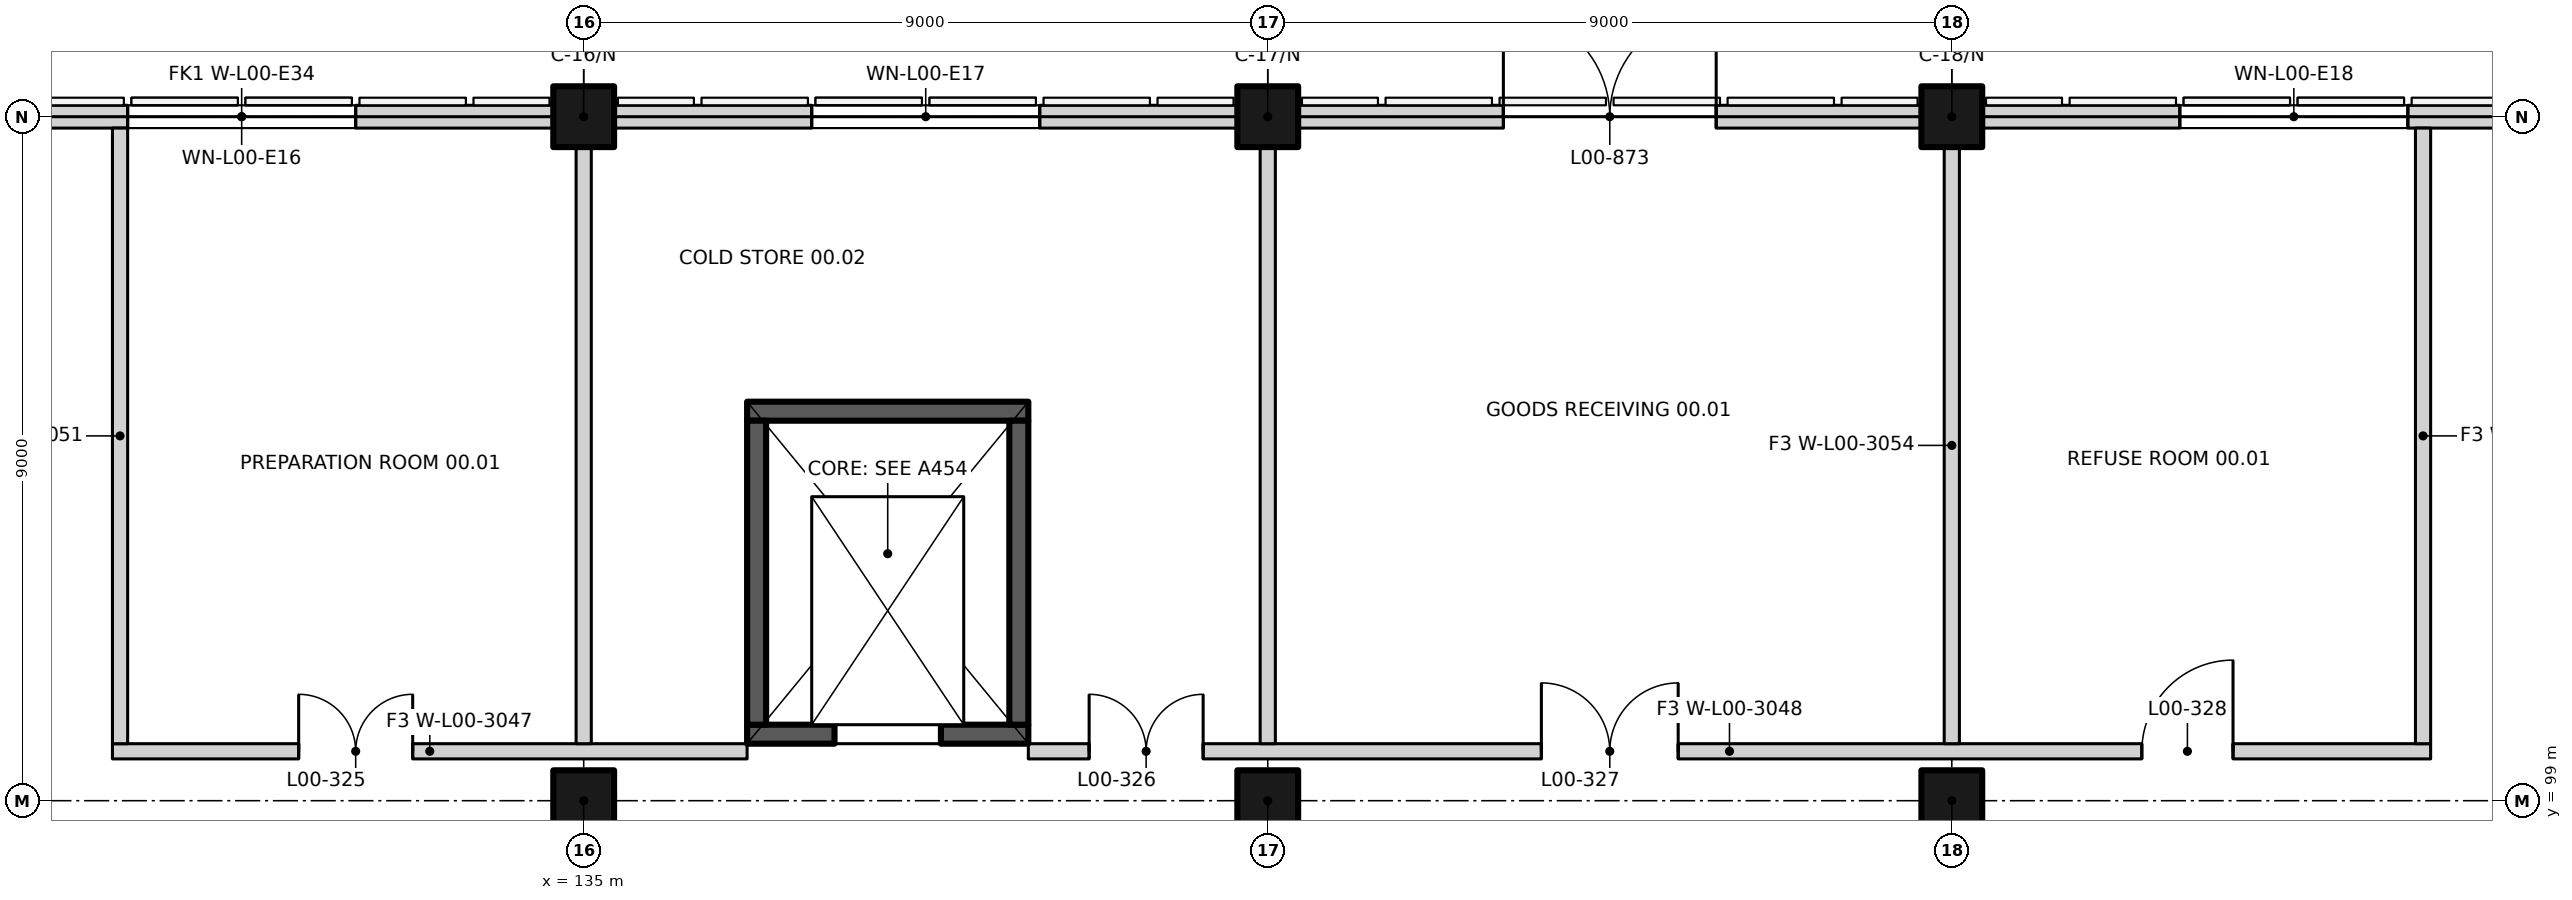
"""IFC4 building model, lengths in metres.
Left out: names, types, materials, properties, quantities, classifications, styles, units other than length and angle.
Written with IfcOpenShell. Run it as: python <this file> out.ifc"""

import sys

from ifc_helpers import new_model, si_unit, direction, frame, frame_2d, origin, origin_2d, place, context, subcontext, project, spatial, rectangle, extrude, element, fill, save


model = new_model("IFC4")
c1 = context("Model", 3, precision=1e-05, world=origin(), true_north=direction((0.0, 1.0)))
c2 = subcontext(c1, "Body", "Model", "MODEL_VIEW")
j1 = project(units=[si_unit("LENGTHUNIT", "METRE"), si_unit("PLANEANGLEUNIT", "RADIAN")], contexts=[c1])
p1 = place(None, origin())
s1 = spatial("IfcSite", under=j1, at=p1, CompositionType="ELEMENT")
p2 = place(p1, origin())
s2 = spatial("IfcBuilding", under=s1, at=p2, CompositionType="ELEMENT")
p3 = place(p2, origin())
s3 = spatial("IfcBuildingStorey", under=s2, at=p3, CompositionType="ELEMENT", Elevation=0.0)
for number, where, z_axis, x_axis in (
    (1, (135.0, 99.0, 0.0), (0.0, 0.0, 1.0), (1.0, 0.0, 0.0)),
    (2, (144.0, 99.0, 0.0), (0.0, 0.0, 1.0), (1.0, 0.0, 0.0)),
    (3, (153.0, 99.0, 0.0), (0.0, 0.0, 1.0), (1.0, 0.0, 0.0)),
    (4, (135.0, 108.0, 0.0), (0.0, 0.0, 1.0), (1.0, 0.0, 0.0)),
    (5, (144.0, 108.0, 0.0), (0.0, 0.0, 1.0), (1.0, 0.0, 0.0)),
    (6, (153.0, 108.0, 0.0), (0.0, 0.0, 1.0), (1.0, 0.0, 0.0)),
):
    element("IfcColumn", number, at=place(p3, frame(where, z_axis=z_axis, x_axis=x_axis)), inside=s3, PredefinedType="COLUMN", context=c2, shape_type="SweptSolid", body=[
        extrude(rectangle(XDim=0.8, YDim=0.8, at=origin_2d()), origin(), (0.0, 0.0, 1.0), 6.0),
    ])
p4 = place(p3, frame((137.15, 99.875, -1.6), z_axis=(0.0, 0.0, 1.0), x_axis=(1.0, 0.0, 0.0)))
e7 = element("IfcWall", 7, at=p4, inside=s3, PredefinedType="SHEAR", context=c2, shape_type="SweptSolid", body=[
    extrude(rectangle(XDim=3.7, YDim=0.25, at=frame_2d((1.85, 0.0))), origin(), (0.0, 0.0, 1.0), 7.6),
])
p5 = place(p4, frame((1.15, 0.0, 1.6)))
e8 = element("IfcOpeningElement", 8, at=p5, cuts=e7, PredefinedType="OPENING", context=c2, shape_type="SweptSolid", body=[
    extrude(rectangle(XDim=1.4, YDim=2.1, at=frame_2d((0.7, 1.05))), frame((0.0, 0.135, 0.0), z_axis=(0.0, -1.0, 0.0), x_axis=(1.0, 0.0, 0.0)), (0.0, 0.0, 1.0), 0.27),
])
p6 = place(p3, frame((137.15, 104.125, -1.6), z_axis=(0.0, 0.0, 1.0), x_axis=(1.0, 0.0, 0.0)))
e9 = element("IfcWall", 9, at=p6, inside=s3, PredefinedType="SHEAR", context=c2, shape_type="SweptSolid", body=[
    extrude(rectangle(XDim=3.7, YDim=0.25, at=frame_2d((1.85, 0.0))), origin(), (0.0, 0.0, 1.0), 7.6),
])
for number, where, z_axis, x_axis in (
    (10, (137.275, 100.0, -1.6), (0.0, 0.0, 1.0), (0.0, 1.0, 0.0)),
    (11, (140.725, 100.0, -1.6), (0.0, 0.0, 1.0), (0.0, 1.0, 0.0)),
):
    element("IfcWall", number, at=place(p3, frame(where, z_axis=z_axis, x_axis=x_axis)), inside=s3, PredefinedType="SHEAR", context=c2, shape_type="SweptSolid", body=[
        extrude(rectangle(XDim=4.0, YDim=0.25, at=frame_2d((2.0, 0.0))), origin(), (0.0, 0.0, 1.0), 7.6),
    ])
p7 = place(p3, frame((126.4, 108.0, 0.0), z_axis=(0.0, 0.0, 1.0), x_axis=(1.0, 0.0, 0.0)))
e12 = element("IfcWall", 12, at=p7, inside=s3, PredefinedType="SOLIDWALL", context=c2, shape_type="SweptSolid", body=[
    extrude(rectangle(XDim=8.2, YDim=0.3, at=frame_2d((4.1, 0.0))), origin(), (0.0, 0.0, 1.0), 5.2),
])
p8 = place(p7, frame((2.6, 0.0, 0.9)))
e13 = element("IfcOpeningElement", 13, at=p8, cuts=e12, PredefinedType="OPENING", context=c2, shape_type="SweptSolid", body=[
    extrude(rectangle(XDim=3.0, YDim=2.1, at=frame_2d((1.5, 1.05))), frame((0.0, 0.16, 0.0), z_axis=(0.0, -1.0, 0.0), x_axis=(1.0, 0.0, 0.0)), (0.0, 0.0, 1.0), 0.32),
])
p9 = place(p3, frame((135.4, 108.0, 0.0), z_axis=(0.0, 0.0, 1.0), x_axis=(1.0, 0.0, 0.0)))
e14 = element("IfcWall", 14, at=p9, inside=s3, PredefinedType="SOLIDWALL", context=c2, shape_type="SweptSolid", body=[
    extrude(rectangle(XDim=8.2, YDim=0.3, at=frame_2d((4.1, 0.0))), origin(), (0.0, 0.0, 1.0), 5.2),
])
p10 = place(p9, frame((2.6, 0.0, 0.9)))
e15 = element("IfcOpeningElement", 15, at=p10, cuts=e14, PredefinedType="OPENING", context=c2, shape_type="SweptSolid", body=[
    extrude(rectangle(XDim=3.0, YDim=2.1, at=frame_2d((1.5, 1.05))), frame((0.0, 0.16, 0.0), z_axis=(0.0, -1.0, 0.0), x_axis=(1.0, 0.0, 0.0)), (0.0, 0.0, 1.0), 0.32),
])
p11 = place(p3, frame((144.4, 108.0, 0.0), z_axis=(0.0, 0.0, 1.0), x_axis=(1.0, 0.0, 0.0)))
e16 = element("IfcWall", 16, at=p11, inside=s3, PredefinedType="SOLIDWALL", context=c2, shape_type="SweptSolid", body=[
    extrude(rectangle(XDim=8.2, YDim=0.3, at=frame_2d((4.1, 0.0))), origin(), (0.0, 0.0, 1.0), 5.2),
])
p12 = place(p11, frame((2.7, 0.0, 0.0)))
e17 = element("IfcOpeningElement", 17, at=p12, cuts=e16, PredefinedType="OPENING", context=c2, shape_type="SweptSolid", body=[
    extrude(rectangle(XDim=2.8, YDim=2.4, at=frame_2d((1.4, 1.2))), frame((0.0, 0.16, 0.0), z_axis=(0.0, -1.0, 0.0), x_axis=(1.0, 0.0, 0.0)), (0.0, 0.0, 1.0), 0.32),
])
p13 = place(p3, frame((153.4, 108.0, 0.0), z_axis=(0.0, 0.0, 1.0), x_axis=(1.0, 0.0, 0.0)))
e18 = element("IfcWall", 18, at=p13, inside=s3, PredefinedType="SOLIDWALL", context=c2, shape_type="SweptSolid", body=[
    extrude(rectangle(XDim=8.2, YDim=0.3, at=frame_2d((4.1, 0.0))), origin(), (0.0, 0.0, 1.0), 5.2),
])
p14 = place(p13, frame((2.6, 0.0, 0.9)))
e19 = element("IfcOpeningElement", 19, at=p14, cuts=e18, PredefinedType="OPENING", context=c2, shape_type="SweptSolid", body=[
    extrude(rectangle(XDim=3.0, YDim=2.1, at=frame_2d((1.5, 1.05))), frame((0.0, 0.16, 0.0), z_axis=(0.0, -1.0, 0.0), x_axis=(1.0, 0.0, 0.0)), (0.0, 0.0, 1.0), 0.32),
])
p15 = place(p3, frame((128.8, 99.65, 0.0), z_axis=(0.0, 0.0, 1.0), x_axis=(1.0, 0.0, 0.0)))
e20 = element("IfcWall", 20, at=p15, inside=s3, PredefinedType="PARTITIONING", context=c2, shape_type="SweptSolid", body=[
    extrude(rectangle(XDim=8.35, YDim=0.2, at=frame_2d((4.175, 0.0))), origin(), (0.0, 0.0, 1.0), 5.2),
])
p16 = place(p15, frame((2.45, 0.0, 0.0)))
e21 = element("IfcOpeningElement", 21, at=p16, cuts=e20, PredefinedType="OPENING", context=c2, shape_type="SweptSolid", body=[
    extrude(rectangle(XDim=1.5, YDim=2.4, at=frame_2d((0.75, 1.2))), frame((0.0, 0.11, 0.0), z_axis=(0.0, -1.0, 0.0), x_axis=(1.0, 0.0, 0.0)), (0.0, 0.0, 1.0), 0.22),
])
p17 = place(p3, frame((140.85, 99.65, 0.0), z_axis=(0.0, 0.0, 1.0), x_axis=(1.0, 0.0, 0.0)))
e22 = element("IfcWall", 22, at=p17, inside=s3, PredefinedType="PARTITIONING", context=c2, shape_type="SweptSolid", body=[
    extrude(rectangle(XDim=18.45, YDim=0.2, at=frame_2d((9.225, 0.0))), origin(), (0.0, 0.0, 1.0), 5.2),
])
p18 = place(p17, frame((0.8, 0.0, 0.0)))
e23 = element("IfcOpeningElement", 23, at=p18, cuts=e22, PredefinedType="OPENING", context=c2, shape_type="SweptSolid", body=[
    extrude(rectangle(XDim=1.5, YDim=2.4, at=frame_2d((0.75, 1.2))), frame((0.0, 0.11, 0.0), z_axis=(0.0, -1.0, 0.0), x_axis=(1.0, 0.0, 0.0)), (0.0, 0.0, 1.0), 0.22),
])
p19 = place(p17, frame((6.75, 0.0, 0.0)))
e24 = element("IfcOpeningElement", 24, at=p19, cuts=e22, PredefinedType="OPENING", context=c2, shape_type="SweptSolid", body=[
    extrude(rectangle(XDim=1.8, YDim=2.4, at=frame_2d((0.9, 1.2))), frame((0.0, 0.11, 0.0), z_axis=(0.0, -1.0, 0.0), x_axis=(1.0, 0.0, 0.0)), (0.0, 0.0, 1.0), 0.22),
])
p20 = place(p17, frame((14.65, 0.0, 0.0)))
e25 = element("IfcOpeningElement", 25, at=p20, cuts=e22, PredefinedType="OPENING", context=c2, shape_type="SweptSolid", body=[
    extrude(rectangle(XDim=1.2, YDim=2.1, at=frame_2d((0.6, 1.05))), frame((0.0, 0.11, 0.0), z_axis=(0.0, -1.0, 0.0), x_axis=(1.0, 0.0, 0.0)), (0.0, 0.0, 1.0), 0.22),
])
p21 = place(p3, frame((128.9, 99.75, 0.0), z_axis=(0.0, 0.0, 1.0), x_axis=(0.0, 1.0, 0.0)))
e26 = element("IfcWall", 26, at=p21, inside=s3, PredefinedType="PARTITIONING", context=c2, shape_type="SweptSolid", body=[
    extrude(rectangle(XDim=8.1, YDim=0.2, at=frame_2d((4.05, 0.0))), origin(), (0.0, 0.0, 1.0), 5.2),
])
for number, where, z_axis, x_axis in (
    (27, (135.0, 99.75, 0.0), (0.0, 0.0, 1.0), (0.0, 1.0, 0.0)),
    (28, (144.0, 99.75, 0.0), (0.0, 0.0, 1.0), (0.0, 1.0, 0.0)),
):
    element("IfcWall", number, at=place(p3, frame(where, z_axis=z_axis, x_axis=x_axis)), inside=s3, PredefinedType="PARTITIONING", context=c2, shape_type="SweptSolid", body=[
        extrude(rectangle(XDim=7.85, YDim=0.2, at=frame_2d((3.925, 0.0))), origin(), (0.0, 0.0, 1.0), 5.2),
    ])
p22 = place(p3, frame((153.0, 99.75, 0.0), z_axis=(0.0, 0.0, 1.0), x_axis=(0.0, 1.0, 0.0)))
e29 = element("IfcWall", 29, at=p22, inside=s3, PredefinedType="PARTITIONING", context=c2, shape_type="SweptSolid", body=[
    extrude(rectangle(XDim=7.85, YDim=0.2, at=frame_2d((3.925, 0.0))), origin(), (0.0, 0.0, 1.0), 5.7),
])
p23 = place(p3, frame((159.2, 99.75, 0.0), z_axis=(0.0, 0.0, 1.0), x_axis=(0.0, 1.0, 0.0)))
e30 = element("IfcWall", 30, at=p23, inside=s3, PredefinedType="PARTITIONING", context=c2, shape_type="SweptSolid", body=[
    extrude(rectangle(XDim=8.1, YDim=0.2, at=frame_2d((4.05, 0.0))), origin(), (0.0, 0.0, 1.0), 5.2),
])
p24 = place(p5, origin())
e31 = element("IfcDoor", 31, at=p24, inside=s3, OperationType="DOUBLE_DOOR_SLIDING", PredefinedType="DOOR", context=c2, shape_type="SweptSolid", body=[
    extrude(rectangle(XDim=1.4, YDim=2.1, at=frame_2d((0.7, 1.05))), frame((0.0, 0.025, 0.0), z_axis=(0.0, -1.0, 0.0), x_axis=(1.0, 0.0, 0.0)), (0.0, 0.0, 1.0), 0.05),
])
fill(e8, e31)
p25 = place(p8, origin())
e32 = element("IfcWindow", 32, at=p25, inside=s3, PartitioningType="SINGLE_PANEL", PredefinedType="WINDOW", context=c2, shape_type="SweptSolid", body=[
    extrude(rectangle(XDim=3.0, YDim=2.1, at=frame_2d((1.5, 1.05))), frame((0.0, -0.03, 0.0), z_axis=(0.0, -1.0, 0.0), x_axis=(1.0, 0.0, 0.0)), (0.0, 0.0, 1.0), 0.06),
])
fill(e13, e32)
p26 = place(p10, origin())
e33 = element("IfcWindow", 33, at=p26, inside=s3, PartitioningType="SINGLE_PANEL", PredefinedType="WINDOW", context=c2, shape_type="SweptSolid", body=[
    extrude(rectangle(XDim=3.0, YDim=2.1, at=frame_2d((1.5, 1.05))), frame((0.0, -0.03, 0.0), z_axis=(0.0, -1.0, 0.0), x_axis=(1.0, 0.0, 0.0)), (0.0, 0.0, 1.0), 0.06),
])
fill(e15, e33)
p27 = place(p12, origin())
e34 = element("IfcDoor", 34, at=p27, inside=s3, OperationType="DOUBLE_DOOR_SINGLE_SWING", PredefinedType="DOOR", context=c2, shape_type="SweptSolid", body=[
    extrude(rectangle(XDim=2.8, YDim=2.4, at=frame_2d((1.4, 1.2))), frame((0.0, 0.025, 0.0), z_axis=(0.0, -1.0, 0.0), x_axis=(1.0, 0.0, 0.0)), (0.0, 0.0, 1.0), 0.05),
])
fill(e17, e34)
p28 = place(p14, origin())
e35 = element("IfcWindow", 35, at=p28, inside=s3, PartitioningType="SINGLE_PANEL", PredefinedType="WINDOW", context=c2, shape_type="SweptSolid", body=[
    extrude(rectangle(XDim=3.0, YDim=2.1, at=frame_2d((1.5, 1.05))), frame((0.0, -0.03, 0.0), z_axis=(0.0, -1.0, 0.0), x_axis=(1.0, 0.0, 0.0)), (0.0, 0.0, 1.0), 0.06),
])
fill(e19, e35)
p29 = place(p16, origin())
e36 = element("IfcDoor", 36, at=p29, inside=s3, OperationType="DOUBLE_DOOR_SINGLE_SWING", PredefinedType="DOOR", context=c2, shape_type="SweptSolid", body=[
    extrude(rectangle(XDim=1.5, YDim=2.4, at=frame_2d((0.75, 1.2))), frame((0.0, 0.025, 0.0), z_axis=(0.0, -1.0, 0.0), x_axis=(1.0, 0.0, 0.0)), (0.0, 0.0, 1.0), 0.05),
])
fill(e21, e36)
p30 = place(p18, origin())
e37 = element("IfcDoor", 37, at=p30, inside=s3, OperationType="DOUBLE_DOOR_SINGLE_SWING", PredefinedType="DOOR", context=c2, shape_type="SweptSolid", body=[
    extrude(rectangle(XDim=1.5, YDim=2.4, at=frame_2d((0.75, 1.2))), frame((0.0, 0.025, 0.0), z_axis=(0.0, -1.0, 0.0), x_axis=(1.0, 0.0, 0.0)), (0.0, 0.0, 1.0), 0.05),
])
fill(e23, e37)
p31 = place(p19, origin())
e38 = element("IfcDoor", 38, at=p31, inside=s3, OperationType="DOUBLE_DOOR_SINGLE_SWING", PredefinedType="DOOR", context=c2, shape_type="SweptSolid", body=[
    extrude(rectangle(XDim=1.8, YDim=2.4, at=frame_2d((0.9, 1.2))), frame((0.0, 0.025, 0.0), z_axis=(0.0, -1.0, 0.0), x_axis=(1.0, 0.0, 0.0)), (0.0, 0.0, 1.0), 0.05),
])
fill(e24, e38)
p32 = place(p20, origin())
e39 = element("IfcDoor", 39, at=p32, inside=s3, OperationType="SINGLE_SWING_RIGHT", PredefinedType="DOOR", context=c2, shape_type="SweptSolid", body=[
    extrude(rectangle(XDim=1.2, YDim=2.1, at=frame_2d((0.6, 1.05))), frame((0.0, 0.025, 0.0), z_axis=(0.0, -1.0, 0.0), x_axis=(1.0, 0.0, 0.0)), (0.0, 0.0, 1.0), 0.05),
])
fill(e25, e39)
save(model, sys.argv[1])
